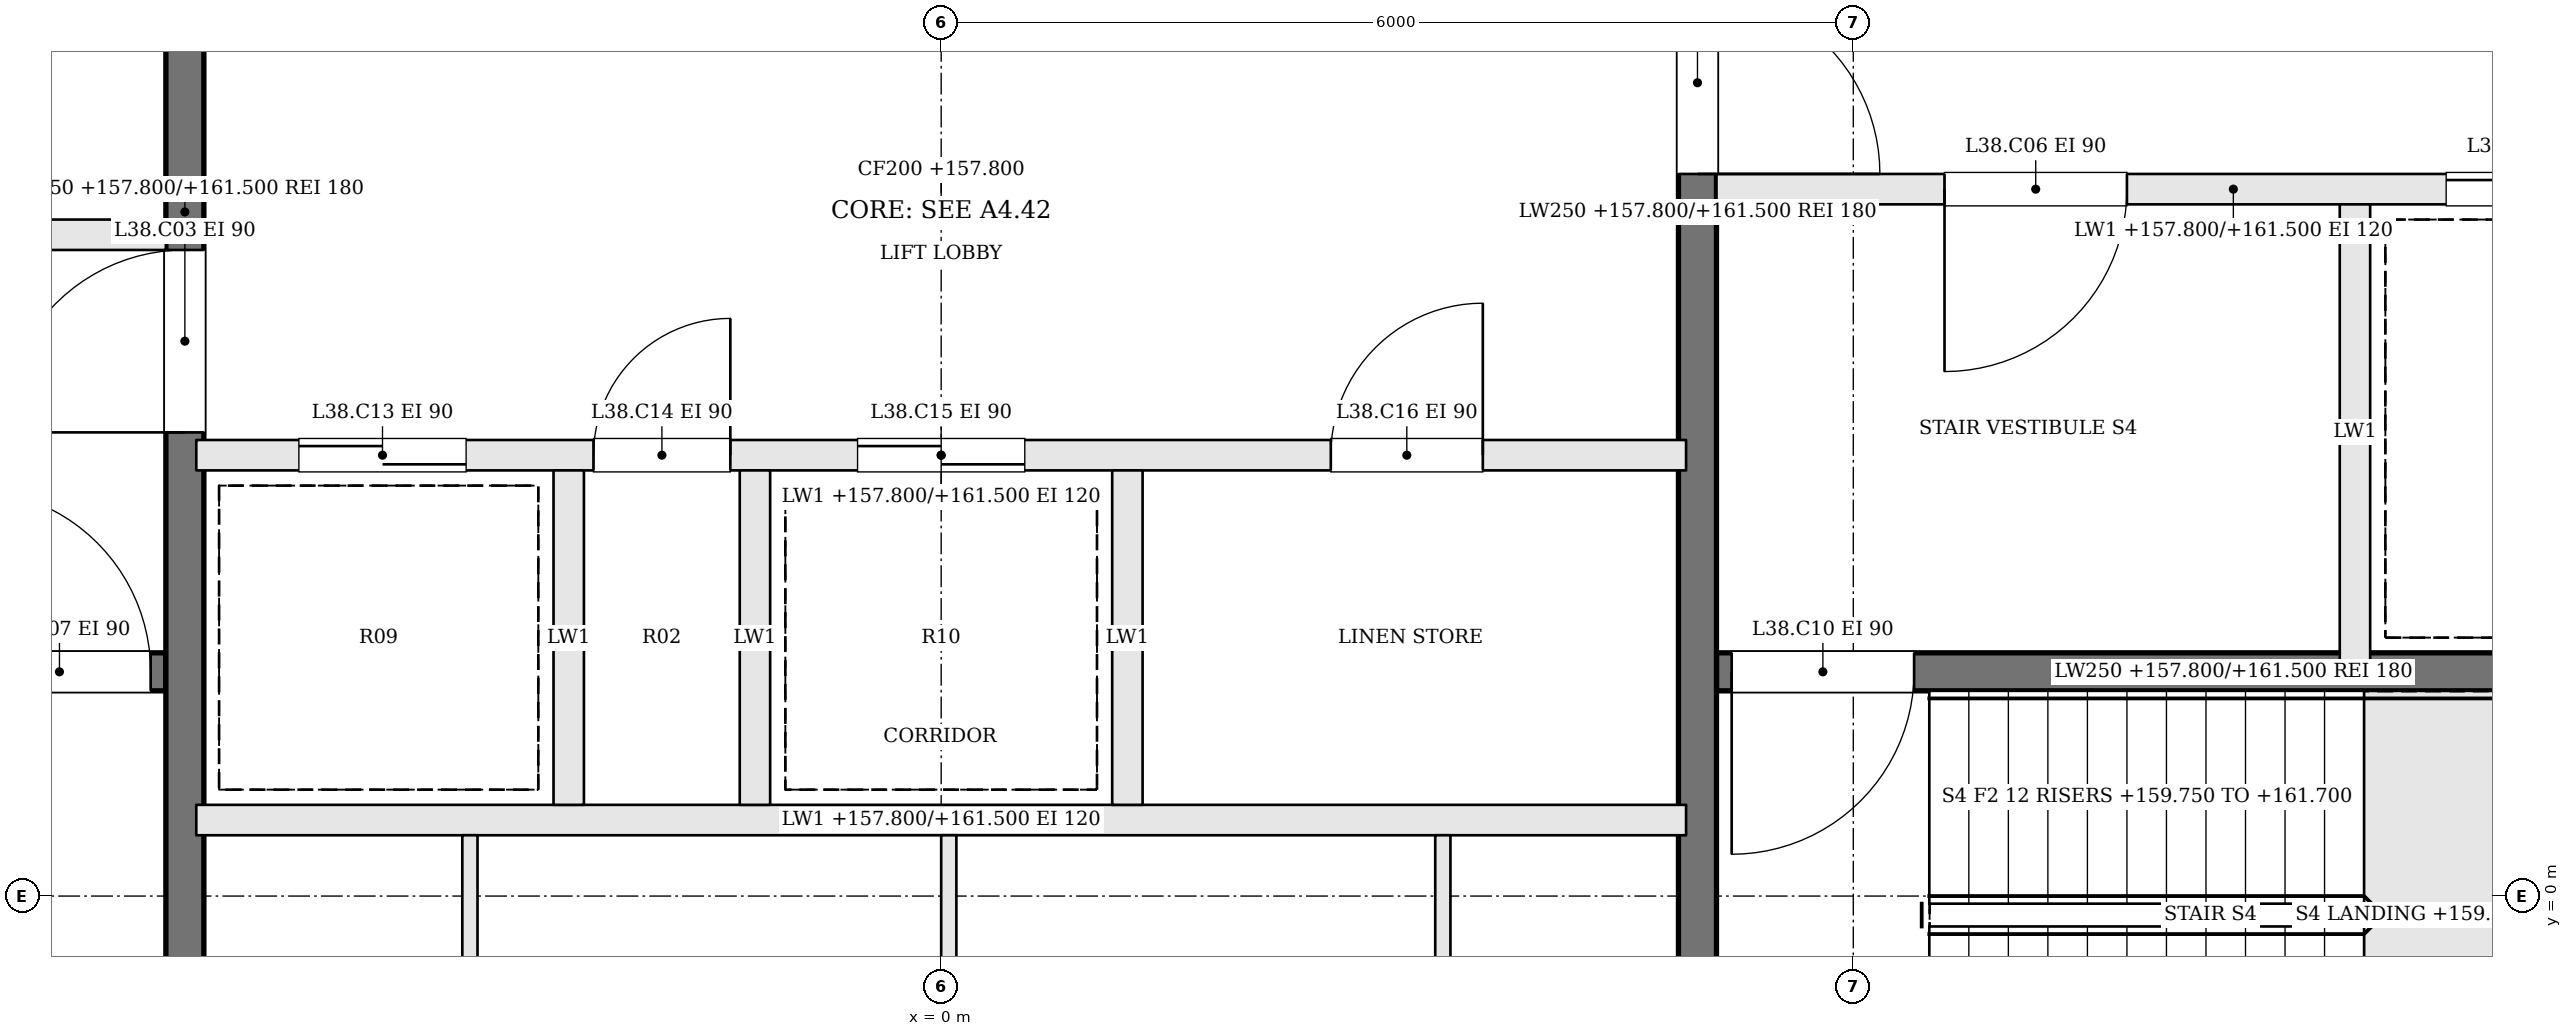
"""IFC4 building model, lengths in metres.
Left out: names, types, materials, properties, quantities, classifications, styles, units other than length and angle.
Written with IfcOpenShell. Run it as: python <this file> out.ifc"""

import sys

from ifc_helpers import new_model, si_unit, direction, frame, frame_2d, origin, place, context, subcontext, project, spatial, rectangle, extrude, element, fill, save


model = new_model("IFC4")
c1 = context("Model", 3, precision=1e-05, world=origin(), true_north=direction((0.0, 1.0)))
c2 = subcontext(c1, "Body", "Model", "MODEL_VIEW")
j1 = project(units=[si_unit("LENGTHUNIT", "METRE"), si_unit("PLANEANGLEUNIT", "RADIAN")], contexts=[c1])
p1 = place(None, origin())
s1 = spatial("IfcSite", under=j1, at=p1, CompositionType="ELEMENT")
p2 = place(p1, origin())
s2 = spatial("IfcBuilding", under=s1, at=p2, CompositionType="ELEMENT")
p3 = place(p2, frame((0.0, 0.0, 157.8)))
s3 = spatial("IfcBuildingStorey", under=s2, at=p3, CompositionType="ELEMENT", Elevation=157.8)
p4 = place(p3, frame((-11.9, 1.475, 0.0), z_axis=(0.0, 0.0, 1.0), x_axis=(1.0, 0.0, 0.0)))
e1 = element("IfcWall", 1, at=p4, inside=s3, PredefinedType="SOLIDWALL", context=c2, shape_type="SweptSolid", body=[
    extrude(rectangle(XDim=6.8, YDim=0.25, at=frame_2d((3.4, 0.0))), origin(), (0.0, 0.0, 1.0), 3.7),
])
p5 = place(p4, frame((5.5, 0.0, 0.0)))
e2 = element("IfcOpeningElement", 2, at=p5, cuts=e1, PredefinedType="OPENING", context=c2, shape_type="SweptSolid", body=[
    extrude(rectangle(XDim=1.2, YDim=2.1, at=frame_2d((0.6, 1.05))), frame((0.0, 0.135, 0.0), z_axis=(0.0, -1.0, 0.0), x_axis=(1.0, 0.0, 0.0)), (0.0, 0.0, 1.0), 0.27),
])
p6 = place(p3, frame((-11.9, 4.35, 0.0), z_axis=(0.0, 0.0, 1.0), x_axis=(1.0, 0.0, 0.0)))
e3 = element("IfcWall", 3, at=p6, inside=s3, PredefinedType="SOLIDWALL", context=c2, shape_type="SweptSolid", body=[
    extrude(rectangle(XDim=6.8, YDim=0.2, at=frame_2d((3.4, 0.0))), origin(), (0.0, 0.0, 1.0), 3.7),
])
p7 = place(p6, frame((4.1, 0.0, 0.0)))
e4 = element("IfcOpeningElement", 4, at=p7, cuts=e3, PredefinedType="OPENING", context=c2, shape_type="SweptSolid", body=[
    extrude(rectangle(XDim=1.2, YDim=2.1, at=frame_2d((0.6, 1.05))), frame((0.0, 0.11, 0.0), z_axis=(0.0, -1.0, 0.0), x_axis=(1.0, 0.0, 0.0)), (0.0, 0.0, 1.0), 0.22),
])
p8 = place(p6, frame((0.8, 0.0, 0.0)))
e5 = element("IfcOpeningElement", 5, at=p8, cuts=e3, PredefinedType="OPENING", context=c2, shape_type="SweptSolid", body=[
    extrude(rectangle(XDim=1.2, YDim=2.1, at=frame_2d((0.6, 1.05))), frame((0.0, 0.11, 0.0), z_axis=(0.0, -1.0, 0.0), x_axis=(1.0, 0.0, 0.0)), (0.0, 0.0, 1.0), 0.22),
])
p9 = place(p3, frame((11.9, 4.65, 0.0), z_axis=(0.0, 0.0, 1.0), x_axis=(-1.0, 0.0, 0.0)))
e6 = element("IfcWall", 6, at=p9, inside=s3, PredefinedType="SOLIDWALL", context=c2, shape_type="SweptSolid", body=[
    extrude(rectangle(XDim=6.8, YDim=0.2, at=frame_2d((3.4, 0.0))), origin(), (0.0, 0.0, 1.0), 3.7),
])
p10 = place(p9, frame((4.1, 0.0, 0.0)))
e7 = element("IfcOpeningElement", 7, at=p10, cuts=e6, PredefinedType="OPENING", context=c2, shape_type="SweptSolid", body=[
    extrude(rectangle(XDim=1.2, YDim=2.1, at=frame_2d((0.6, 1.05))), frame((0.0, 0.11, 0.0), z_axis=(0.0, -1.0, 0.0), x_axis=(1.0, 0.0, 0.0)), (0.0, 0.0, 1.0), 0.22),
])
p11 = place(p9, frame((0.8, 0.0, 0.0)))
e8 = element("IfcOpeningElement", 8, at=p11, cuts=e6, PredefinedType="OPENING", context=c2, shape_type="SweptSolid", body=[
    extrude(rectangle(XDim=1.2, YDim=2.1, at=frame_2d((0.6, 1.05))), frame((0.0, 0.11, 0.0), z_axis=(0.0, -1.0, 0.0), x_axis=(1.0, 0.0, 0.0)), (0.0, 0.0, 1.0), 0.22),
])
p12 = place(p3, frame((11.9, 1.475, 0.0), z_axis=(0.0, 0.0, 1.0), x_axis=(-1.0, 0.0, 0.0)))
e9 = element("IfcWall", 9, at=p12, inside=s3, PredefinedType="SOLIDWALL", context=c2, shape_type="SweptSolid", body=[
    extrude(rectangle(XDim=6.8, YDim=0.25, at=frame_2d((3.4, 0.0))), origin(), (0.0, 0.0, 1.0), 3.7),
])
p13 = place(p12, frame((5.5, 0.0, 0.0)))
e10 = element("IfcOpeningElement", 10, at=p13, cuts=e9, PredefinedType="OPENING", context=c2, shape_type="SweptSolid", body=[
    extrude(rectangle(XDim=1.2, YDim=2.1, at=frame_2d((0.6, 1.05))), frame((0.0, 0.135, 0.0), z_axis=(0.0, -1.0, 0.0), x_axis=(1.0, 0.0, 0.0)), (0.0, 0.0, 1.0), 0.27),
])
p14 = place(p3, frame((9.3, 4.55, 0.0), z_axis=(0.0, 0.0, 1.0), x_axis=(0.0, -1.0, 0.0)))
e11 = element("IfcWall", 11, at=p14, inside=s3, PredefinedType="SOLIDWALL", context=c2, shape_type="SweptSolid", body=[
    extrude(rectangle(XDim=3.0, YDim=0.2, at=frame_2d((1.5, 0.0))), origin(), (0.0, 0.0, 1.0), 3.7),
])
p15 = place(p3, frame((-4.975, -1.9, 0.0), z_axis=(0.0, 0.0, 1.0), x_axis=(0.0, 1.0, 0.0)))
e12 = element("IfcWall", 12, at=p15, inside=s3, PredefinedType="SOLIDWALL", context=c2, shape_type="SweptSolid", body=[
    extrude(rectangle(XDim=12.8, YDim=0.25, at=frame_2d((6.4, 0.0))), origin(), (0.0, 0.0, 1.0), 3.7),
])
p16 = place(p15, frame((4.95, 0.0, 0.0)))
e13 = element("IfcOpeningElement", 13, at=p16, cuts=e12, PredefinedType="OPENING", context=c2, shape_type="SweptSolid", body=[
    extrude(rectangle(XDim=1.2, YDim=2.1, at=frame_2d((0.6, 1.05))), frame((0.0, 0.135, 0.0), z_axis=(0.0, -1.0, 0.0), x_axis=(1.0, 0.0, 0.0)), (0.0, 0.0, 1.0), 0.27),
])
p17 = place(p3, frame((4.975, 10.9, 0.0), z_axis=(0.0, 0.0, 1.0), x_axis=(0.0, -1.0, 0.0)))
e14 = element("IfcWall", 14, at=p17, inside=s3, PredefinedType="SOLIDWALL", context=c2, shape_type="SweptSolid", body=[
    extrude(rectangle(XDim=12.8, YDim=0.25, at=frame_2d((6.4, 0.0))), origin(), (0.0, 0.0, 1.0), 3.7),
])
p18 = place(p17, frame((4.95, 0.0, 0.0)))
e15 = element("IfcOpeningElement", 15, at=p18, cuts=e14, PredefinedType="OPENING", context=c2, shape_type="SweptSolid", body=[
    extrude(rectangle(XDim=1.2, YDim=2.1, at=frame_2d((0.6, 1.05))), frame((0.0, 0.135, 0.0), z_axis=(0.0, -1.0, 0.0), x_axis=(1.0, 0.0, 0.0)), (0.0, 0.0, 1.0), 0.27),
])
p19 = place(p3, frame((-4.9, 0.5, 0.0), z_axis=(0.0, 0.0, 1.0), x_axis=(1.0, 0.0, 0.0)))
e16 = element("IfcWall", 16, at=p19, inside=s3, PredefinedType="SOLIDWALL", context=c2, shape_type="SweptSolid", body=[
    extrude(rectangle(XDim=9.8, YDim=0.2, at=frame_2d((4.9, 0.0))), origin(), (0.0, 0.0, 1.0), 3.7),
])
p20 = place(p3, frame((-4.9, 2.9, 0.0), z_axis=(0.0, 0.0, 1.0), x_axis=(1.0, 0.0, 0.0)))
e17 = element("IfcWall", 17, at=p20, inside=s3, PredefinedType="SOLIDWALL", context=c2, shape_type="SweptSolid", body=[
    extrude(rectangle(XDim=9.8, YDim=0.2, at=frame_2d((4.9, 0.0))), origin(), (0.0, 0.0, 1.0), 3.7),
])
p21 = place(p20, frame((0.675, 0.0, 0.0)))
e18 = element("IfcOpeningElement", 18, at=p21, cuts=e17, PredefinedType="OPENING", context=c2, shape_type="SweptSolid", body=[
    extrude(rectangle(XDim=1.1, YDim=2.1, at=frame_2d((0.55, 1.05))), frame((0.0, 0.11, 0.0), z_axis=(0.0, -1.0, 0.0), x_axis=(1.0, 0.0, 0.0)), (0.0, 0.0, 1.0), 0.22),
])
p22 = place(p20, frame((2.613, 0.0, 0.0)))
e19 = element("IfcOpeningElement", 19, at=p22, cuts=e17, PredefinedType="OPENING", context=c2, shape_type="SweptSolid", body=[
    extrude(rectangle(XDim=0.9, YDim=2.1, at=frame_2d((0.45, 1.05))), frame((0.0, 0.11, 0.0), z_axis=(0.0, -1.0, 0.0), x_axis=(1.0, 0.0, 0.0)), (0.0, 0.0, 1.0), 0.22),
])
p23 = place(p20, frame((4.35, 0.0, 0.0)))
e20 = element("IfcOpeningElement", 20, at=p23, cuts=e17, PredefinedType="OPENING", context=c2, shape_type="SweptSolid", body=[
    extrude(rectangle(XDim=1.1, YDim=2.1, at=frame_2d((0.55, 1.05))), frame((0.0, 0.11, 0.0), z_axis=(0.0, -1.0, 0.0), x_axis=(1.0, 0.0, 0.0)), (0.0, 0.0, 1.0), 0.22),
])
p24 = place(p20, frame((7.463, 0.0, 0.0)))
e21 = element("IfcOpeningElement", 21, at=p24, cuts=e17, PredefinedType="OPENING", context=c2, shape_type="SweptSolid", body=[
    extrude(rectangle(XDim=1.0, YDim=2.1, at=frame_2d((0.5, 1.05))), frame((0.0, 0.11, 0.0), z_axis=(0.0, -1.0, 0.0), x_axis=(1.0, 0.0, 0.0)), (0.0, 0.0, 1.0), 0.22),
])
for number, where, z_axis, x_axis in (
    (22, (-2.45, 0.6, 0.0), (0.0, 0.0, 1.0), (0.0, 1.0, 0.0)),
    (23, (-1.225, 0.6, 0.0), (0.0, 0.0, 1.0), (0.0, 1.0, 0.0)),
    (24, (1.225, 0.6, 0.0), (0.0, 0.0, 1.0), (0.0, 1.0, 0.0)),
):
    element("IfcWall", number, at=place(p3, frame(where, z_axis=z_axis, x_axis=x_axis)), inside=s3, PredefinedType="SOLIDWALL", context=c2, shape_type="SweptSolid", body=[
        extrude(rectangle(XDim=2.2, YDim=0.2, at=frame_2d((1.1, 0.0))), origin(), (0.0, 0.0, 1.0), 3.7),
    ])
for number, where, z_axis, x_axis in (
    (25, (-3.1, -1.9, 0.0), (0.0, 0.0, 1.0), (0.0, 1.0, 0.0)),
    (26, (0.05, -1.9, 0.0), (0.0, 0.0, 1.0), (0.0, 1.0, 0.0)),
    (27, (3.3, -1.9, 0.0), (0.0, 0.0, 1.0), (0.0, 1.0, 0.0)),
):
    element("IfcWall", number, at=place(p3, frame(where, z_axis=z_axis, x_axis=x_axis)), inside=s3, PredefinedType="PARTITIONING", context=c2, shape_type="SweptSolid", body=[
        extrude(rectangle(XDim=2.3, YDim=0.1, at=frame_2d((1.15, 0.0))), origin(), (0.0, 0.0, 1.0), 3.7),
    ])
p25 = place(p16, origin())
e28 = element("IfcDoor", 28, at=p25, inside=s3, OperationType="SINGLE_SWING_LEFT", PredefinedType="DOOR", context=c2, shape_type="SweptSolid", body=[
    extrude(rectangle(XDim=1.2, YDim=2.1, at=frame_2d((0.6, 1.05))), frame((0.0, 0.025, 0.0), z_axis=(0.0, -1.0, 0.0), x_axis=(1.0, 0.0, 0.0)), (0.0, 0.0, 1.0), 0.05),
])
fill(e13, e28)
p26 = place(p18, origin())
e29 = element("IfcDoor", 29, at=p26, inside=s3, OperationType="SINGLE_SWING_RIGHT", PredefinedType="DOOR", context=c2, shape_type="SweptSolid", body=[
    extrude(rectangle(XDim=1.2, YDim=2.1, at=frame_2d((0.6, 1.05))), frame((0.0, 0.025, 0.0), z_axis=(0.0, -1.0, 0.0), x_axis=(1.0, 0.0, 0.0)), (0.0, 0.0, 1.0), 0.05),
])
fill(e15, e29)
p27 = place(p10, origin())
e30 = element("IfcDoor", 30, at=p27, inside=s3, OperationType="SINGLE_SWING_RIGHT", PredefinedType="DOOR", context=c2, shape_type="SweptSolid", body=[
    extrude(rectangle(XDim=1.2, YDim=2.1, at=frame_2d((0.6, 1.05))), frame((0.0, 0.025, 0.0), z_axis=(0.0, -1.0, 0.0), x_axis=(1.0, 0.0, 0.0)), (0.0, 0.0, 1.0), 0.05),
])
fill(e7, e30)
p28 = place(p5, origin())
e31 = element("IfcDoor", 31, at=p28, inside=s3, OperationType="SINGLE_SWING_LEFT", PredefinedType="DOOR", context=c2, shape_type="SweptSolid", body=[
    extrude(rectangle(XDim=1.2, YDim=2.1, at=frame_2d((0.6, 1.05))), frame((0.0, 0.025, 0.0), z_axis=(0.0, -1.0, 0.0), x_axis=(1.0, 0.0, 0.0)), (0.0, 0.0, 1.0), 0.05),
])
fill(e2, e31)
p29 = place(p13, origin())
e32 = element("IfcDoor", 32, at=p29, inside=s3, OperationType="SINGLE_SWING_RIGHT", PredefinedType="DOOR", context=c2, shape_type="SweptSolid", body=[
    extrude(rectangle(XDim=1.2, YDim=2.1, at=frame_2d((0.6, 1.05))), frame((0.0, 0.025, 0.0), z_axis=(0.0, -1.0, 0.0), x_axis=(1.0, 0.0, 0.0)), (0.0, 0.0, 1.0), 0.05),
])
fill(e10, e32)
p30 = place(p11, origin())
e33 = element("IfcDoor", 33, at=p30, inside=s3, OperationType="SLIDING_TO_RIGHT", PredefinedType="DOOR", context=c2, shape_type="SweptSolid", body=[
    extrude(rectangle(XDim=1.2, YDim=2.1, at=frame_2d((0.6, 1.05))), frame((0.0, 0.025, 0.0), z_axis=(0.0, -1.0, 0.0), x_axis=(1.0, 0.0, 0.0)), (0.0, 0.0, 1.0), 0.05),
])
fill(e8, e33)
p31 = place(p21, origin())
e34 = element("IfcDoor", 34, at=p31, inside=s3, OperationType="SLIDING_TO_RIGHT", PredefinedType="DOOR", context=c2, shape_type="SweptSolid", body=[
    extrude(rectangle(XDim=1.1, YDim=2.1, at=frame_2d((0.55, 1.05))), frame((0.0, 0.025, 0.0), z_axis=(0.0, -1.0, 0.0), x_axis=(1.0, 0.0, 0.0)), (0.0, 0.0, 1.0), 0.05),
])
fill(e18, e34)
p32 = place(p22, origin())
e35 = element("IfcDoor", 35, at=p32, inside=s3, OperationType="SINGLE_SWING_RIGHT", PredefinedType="DOOR", context=c2, shape_type="SweptSolid", body=[
    extrude(rectangle(XDim=0.9, YDim=2.1, at=frame_2d((0.45, 1.05))), frame((0.0, 0.025, 0.0), z_axis=(0.0, -1.0, 0.0), x_axis=(1.0, 0.0, 0.0)), (0.0, 0.0, 1.0), 0.05),
])
fill(e19, e35)
p33 = place(p23, origin())
e36 = element("IfcDoor", 36, at=p33, inside=s3, OperationType="SLIDING_TO_LEFT", PredefinedType="DOOR", context=c2, shape_type="SweptSolid", body=[
    extrude(rectangle(XDim=1.1, YDim=2.1, at=frame_2d((0.55, 1.05))), frame((0.0, 0.025, 0.0), z_axis=(0.0, -1.0, 0.0), x_axis=(1.0, 0.0, 0.0)), (0.0, 0.0, 1.0), 0.05),
])
fill(e20, e36)
p34 = place(p24, origin())
e37 = element("IfcDoor", 37, at=p34, inside=s3, OperationType="SINGLE_SWING_RIGHT", PredefinedType="DOOR", context=c2, shape_type="SweptSolid", body=[
    extrude(rectangle(XDim=1.0, YDim=2.1, at=frame_2d((0.5, 1.05))), frame((0.0, 0.025, 0.0), z_axis=(0.0, -1.0, 0.0), x_axis=(1.0, 0.0, 0.0)), (0.0, 0.0, 1.0), 0.05),
])
fill(e21, e37)
save(model, sys.argv[1])
